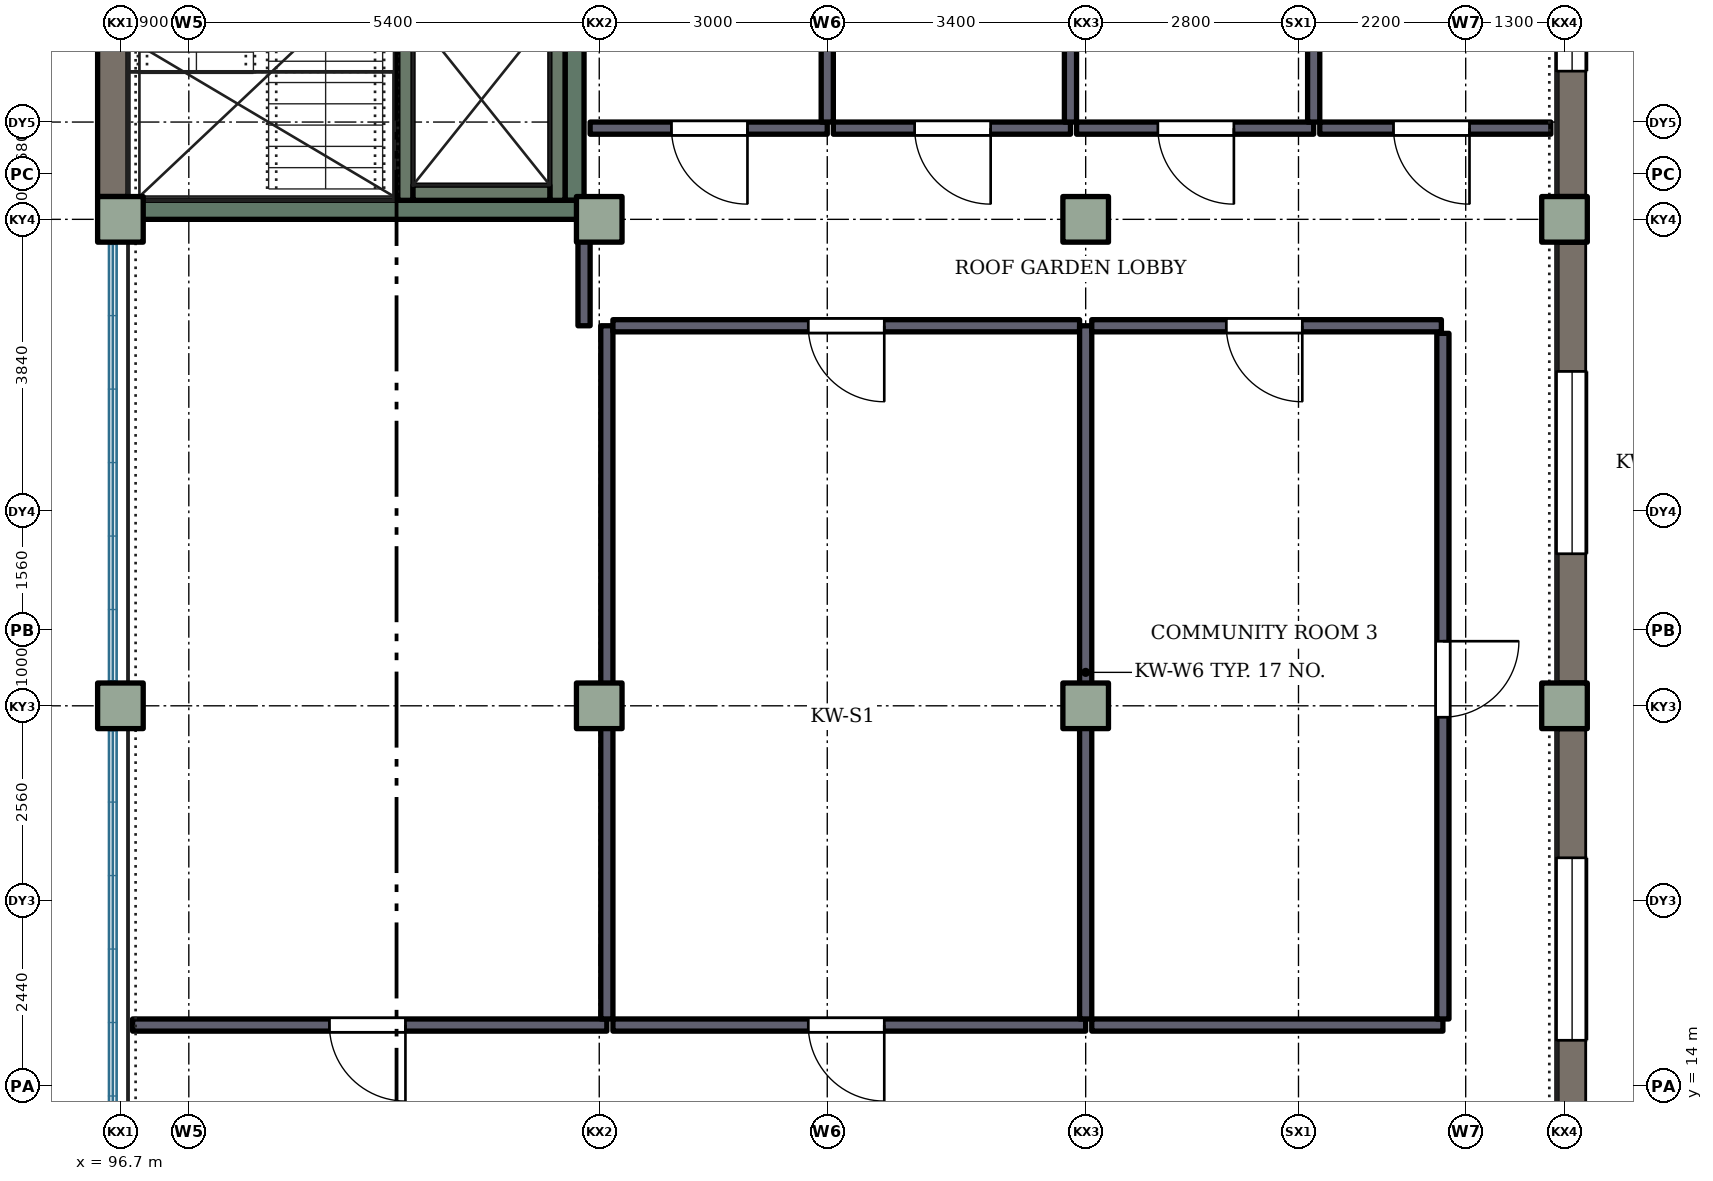
"""IFC4 building model, lengths in metres.
Left out: names, types, materials, properties, quantities, classifications, styles, units other than length and angle.
Written with IfcOpenShell. Run it as: python <this file> out.ifc"""

import sys

from ifc_helpers import new_model, si_unit, direction, frame, frame_2d, origin, origin_2d, place, context, subcontext, project, spatial, rectangle, extrude, element, fill, save


model = new_model("IFC4")
c1 = context("Model", 3, precision=1e-05, world=origin(), true_north=direction((0.0, 1.0)))
c2 = subcontext(c1, "Body", "Model", "MODEL_VIEW")
j1 = project(units=[si_unit("LENGTHUNIT", "METRE"), si_unit("PLANEANGLEUNIT", "RADIAN")], contexts=[c1])
p1 = place(None, origin())
s1 = spatial("IfcSite", under=j1, at=p1, CompositionType="ELEMENT")
p2 = place(p1, origin())
s2 = spatial("IfcBuilding", under=s1, at=p2, CompositionType="ELEMENT")
p3 = place(p2, frame((0.0, 0.0, 8.4)))
s3 = spatial("IfcBuildingStorey", under=s2, at=p3, CompositionType="ELEMENT", Elevation=8.4)
for number, where, z_axis, x_axis in (
    (1, (96.7, 19.0, 0.0), (0.0, 0.0, 1.0), (1.0, 0.0, 0.0)),
    (2, (96.7, 25.4, 0.0), (0.0, 0.0, 1.0), (1.0, 0.0, 0.0)),
    (3, (103.0, 19.0, 0.0), (0.0, 0.0, 1.0), (1.0, 0.0, 0.0)),
    (4, (103.0, 25.4, 0.0), (0.0, 0.0, 1.0), (1.0, 0.0, 0.0)),
    (5, (109.4, 19.0, 0.0), (0.0, 0.0, 1.0), (1.0, 0.0, 0.0)),
    (6, (109.4, 25.4, 0.0), (0.0, 0.0, 1.0), (1.0, 0.0, 0.0)),
    (7, (115.7, 19.0, 0.0), (0.0, 0.0, 1.0), (1.0, 0.0, 0.0)),
    (8, (115.7, 25.4, 0.0), (0.0, 0.0, 1.0), (1.0, 0.0, 0.0)),
):
    element("IfcColumn", number, at=place(p3, frame(where, z_axis=z_axis, x_axis=x_axis)), inside=s3, PredefinedType="COLUMN", context=c2, shape_type="SweptSolid", body=[
        extrude(rectangle(XDim=0.6, YDim=0.6, at=origin_2d()), origin(), (0.0, 0.0, 1.0), 4.2),
    ])
p4 = place(p3, frame((96.6, 25.7, 0.0), z_axis=(0.0, 0.0, 1.0), x_axis=(0.0, 1.0, 0.0)))
e9 = element("IfcWall", 9, at=p4, inside=s3, PredefinedType="SOLIDWALL", context=c2, shape_type="SweptSolid", body=[
    extrude(rectangle(XDim=5.7, YDim=0.4, at=frame_2d((2.85, 0.0))), origin(), (0.0, 0.0, 1.0), 4.2),
])
p5 = place(p3, frame((115.8, 18.7, 0.0), z_axis=(0.0, 0.0, 1.0), x_axis=(0.0, -1.0, 0.0)))
e10 = element("IfcWall", 10, at=p5, inside=s3, PredefinedType="SOLIDWALL", context=c2, shape_type="SweptSolid", body=[
    extrude(rectangle(XDim=5.8, YDim=0.4, at=frame_2d((2.9, 0.0))), origin(), (0.0, 0.0, 1.0), 4.2),
])
p6 = place(p5, frame((1.7, 0.0, 0.9)))
e11 = element("IfcOpeningElement", 11, at=p6, cuts=e10, PredefinedType="OPENING", context=c2, shape_type="SweptSolid", body=[
    extrude(rectangle(XDim=2.4, YDim=2.7, at=frame_2d((1.2, 1.35))), frame((0.0, 0.21, 0.0), z_axis=(0.0, -1.0, 0.0), x_axis=(1.0, 0.0, 0.0)), (0.0, 0.0, 1.0), 0.42),
])
p7 = place(p3, frame((115.8, 25.1, 0.0), z_axis=(0.0, 0.0, 1.0), x_axis=(0.0, -1.0, 0.0)))
e12 = element("IfcWall", 12, at=p7, inside=s3, PredefinedType="SOLIDWALL", context=c2, shape_type="SweptSolid", body=[
    extrude(rectangle(XDim=5.8, YDim=0.4, at=frame_2d((2.9, 0.0))), origin(), (0.0, 0.0, 1.0), 4.2),
])
p8 = place(p7, frame((1.7, 0.0, 0.9)))
e13 = element("IfcOpeningElement", 13, at=p8, cuts=e12, PredefinedType="OPENING", context=c2, shape_type="SweptSolid", body=[
    extrude(rectangle(XDim=2.4, YDim=2.7, at=frame_2d((1.2, 1.35))), frame((0.0, 0.21, 0.0), z_axis=(0.0, -1.0, 0.0), x_axis=(1.0, 0.0, 0.0)), (0.0, 0.0, 1.0), 0.42),
])
p9 = place(p3, frame((115.8, 31.4, 0.0), z_axis=(0.0, 0.0, 1.0), x_axis=(0.0, -1.0, 0.0)))
e14 = element("IfcWall", 14, at=p9, inside=s3, PredefinedType="SOLIDWALL", context=c2, shape_type="SweptSolid", body=[
    extrude(rectangle(XDim=5.7, YDim=0.4, at=frame_2d((2.85, 0.0))), origin(), (0.0, 0.0, 1.0), 4.2),
])
p10 = place(p9, frame((1.65, 0.0, 0.9)))
e15 = element("IfcOpeningElement", 15, at=p10, cuts=e14, PredefinedType="OPENING", context=c2, shape_type="SweptSolid", body=[
    extrude(rectangle(XDim=2.4, YDim=2.7, at=frame_2d((1.2, 1.35))), frame((0.0, 0.21, 0.0), z_axis=(0.0, -1.0, 0.0), x_axis=(1.0, 0.0, 0.0)), (0.0, 0.0, 1.0), 0.42),
])
p11 = place(p3, frame((102.675, 25.65, 0.0), z_axis=(0.0, 0.0, 1.0), x_axis=(0.0, 1.0, 0.0)))
e16 = element("IfcWall", 16, at=p11, inside=s3, PredefinedType="SHEAR", context=c2, shape_type="SweptSolid", body=[
    extrude(rectangle(XDim=5.95, YDim=0.25, at=frame_2d((2.975, 0.0))), origin(), (0.0, 0.0, 1.0), 4.2),
])
p12 = place(p11, frame((4.0, 0.0, 0.0)))
e17 = element("IfcOpeningElement", 17, at=p12, cuts=e16, PredefinedType="OPENING", context=c2, shape_type="SweptSolid", body=[
    extrude(rectangle(XDim=1.0, YDim=2.1, at=frame_2d((0.5, 1.05))), frame((0.0, 0.135, 0.0), z_axis=(0.0, -1.0, 0.0), x_axis=(1.0, 0.0, 0.0)), (0.0, 0.0, 1.0), 0.27),
])
p13 = place(p3, frame((96.8, 25.525, 0.0), z_axis=(0.0, 0.0, 1.0), x_axis=(1.0, 0.0, 0.0)))
e18 = element("IfcWall", 18, at=p13, inside=s3, PredefinedType="SHEAR", context=c2, shape_type="SweptSolid", body=[
    extrude(rectangle(XDim=6.0, YDim=0.25, at=frame_2d((3.0, 0.0))), origin(), (0.0, 0.0, 1.0), 4.2),
])
for number, where, z_axis, x_axis in (
    (19, (100.45, 25.65, 0.0), (0.0, 0.0, 1.0), (0.0, 1.0, 0.0)),
    (20, (102.45, 25.65, 0.0), (0.0, 0.0, 1.0), (0.0, 1.0, 0.0)),
):
    element("IfcWall", number, at=place(p3, frame(where, z_axis=z_axis, x_axis=x_axis)), inside=s3, PredefinedType="SHEAR", context=c2, shape_type="SweptSolid", body=[
        extrude(rectangle(XDim=2.65, YDim=0.2, at=frame_2d((1.325, 0.0))), origin(), (0.0, 0.0, 1.0), 4.2),
    ])
p14 = place(p3, frame((100.55, 25.75, 0.0), z_axis=(0.0, 0.0, 1.0), x_axis=(1.0, 0.0, 0.0)))
e21 = element("IfcWall", 21, at=p14, inside=s3, PredefinedType="SHEAR", context=c2, shape_type="SweptSolid", body=[
    extrude(rectangle(XDim=1.8, YDim=0.2, at=frame_2d((0.9, 0.0))), origin(), (0.0, 0.0, 1.0), 4.2),
])
p15 = place(p3, frame((102.8, 24.0, 0.0), z_axis=(0.0, 0.0, 1.0), x_axis=(0.0, 1.0, 0.0)))
e22 = element("IfcWall", 22, at=p15, inside=s3, PredefinedType="PARTITIONING", context=c2, shape_type="SweptSolid", body=[
    extrude(rectangle(XDim=1.32, YDim=0.16, at=frame_2d((0.66, 0.0))), origin(), (0.0, 0.0, 1.0), 3.9),
])
p16 = place(p3, frame((103.1, 14.8, 0.0), z_axis=(0.0, 0.0, 1.0), x_axis=(-1.0, 0.0, 0.0)))
e23 = element("IfcWall", 23, at=p16, inside=s3, PredefinedType="PARTITIONING", context=c2, shape_type="SweptSolid", body=[
    extrude(rectangle(XDim=6.24, YDim=0.16, at=frame_2d((3.12, 0.0))), origin(), (0.0, 0.0, 1.0), 3.9),
])
p17 = place(p16, frame((2.65, 0.0, 0.0)))
e24 = element("IfcOpeningElement", 24, at=p17, cuts=e23, PredefinedType="OPENING", context=c2, shape_type="SweptSolid", body=[
    extrude(rectangle(XDim=1.0, YDim=2.1, at=frame_2d((0.5, 1.05))), frame((0.0, 0.09, 0.0), z_axis=(0.0, -1.0, 0.0), x_axis=(1.0, 0.0, 0.0)), (0.0, 0.0, 1.0), 0.18),
])
p18 = place(p3, frame((103.1, 14.88, 0.0), z_axis=(0.0, 0.0, 1.0), x_axis=(0.0, 1.0, 0.0)))
e25 = element("IfcWall", 25, at=p18, inside=s3, PredefinedType="PARTITIONING", context=c2, shape_type="SweptSolid", body=[
    extrude(rectangle(XDim=9.12, YDim=0.16, at=frame_2d((4.56, 0.0))), origin(), (0.0, 0.0, 1.0), 3.9),
])
p19 = place(p3, frame((106.0, 26.6, 0.0), z_axis=(0.0, 0.0, 1.0), x_axis=(-1.0, 0.0, 0.0)))
e26 = element("IfcWall", 26, at=p19, inside=s3, PredefinedType="PARTITIONING", context=c2, shape_type="SweptSolid", body=[
    extrude(rectangle(XDim=3.12, YDim=0.16, at=frame_2d((1.56, 0.0))), origin(), (0.0, 0.0, 1.0), 3.9),
])
p20 = place(p19, frame((1.05, 0.0, 0.0)))
e27 = element("IfcOpeningElement", 27, at=p20, cuts=e26, PredefinedType="OPENING", context=c2, shape_type="SweptSolid", body=[
    extrude(rectangle(XDim=1.0, YDim=2.1, at=frame_2d((0.5, 1.05))), frame((0.0, 0.09, 0.0), z_axis=(0.0, -1.0, 0.0), x_axis=(1.0, 0.0, 0.0)), (0.0, 0.0, 1.0), 0.18),
])
p21 = place(p3, frame((106.0, 26.68, 0.0), z_axis=(0.0, 0.0, 1.0), x_axis=(0.0, 1.0, 0.0)))
e28 = element("IfcWall", 28, at=p21, inside=s3, PredefinedType="PARTITIONING", context=c2, shape_type="SweptSolid", body=[
    extrude(rectangle(XDim=4.84, YDim=0.16, at=frame_2d((2.42, 0.0))), origin(), (0.0, 0.0, 1.0), 3.9),
])
p22 = place(p3, frame((109.2, 26.6, 0.0), z_axis=(0.0, 0.0, 1.0), x_axis=(-1.0, 0.0, 0.0)))
e29 = element("IfcWall", 29, at=p22, inside=s3, PredefinedType="PARTITIONING", context=c2, shape_type="SweptSolid", body=[
    extrude(rectangle(XDim=3.12, YDim=0.16, at=frame_2d((1.56, 0.0))), origin(), (0.0, 0.0, 1.0), 3.9),
])
p23 = place(p22, frame((1.05, 0.0, 0.0)))
e30 = element("IfcOpeningElement", 30, at=p23, cuts=e29, PredefinedType="OPENING", context=c2, shape_type="SweptSolid", body=[
    extrude(rectangle(XDim=1.0, YDim=2.1, at=frame_2d((0.5, 1.05))), frame((0.0, 0.09, 0.0), z_axis=(0.0, -1.0, 0.0), x_axis=(1.0, 0.0, 0.0)), (0.0, 0.0, 1.0), 0.18),
])
p24 = place(p3, frame((109.2, 26.68, 0.0), z_axis=(0.0, 0.0, 1.0), x_axis=(0.0, 1.0, 0.0)))
e31 = element("IfcWall", 31, at=p24, inside=s3, PredefinedType="PARTITIONING", context=c2, shape_type="SweptSolid", body=[
    extrude(rectangle(XDim=4.92, YDim=0.16, at=frame_2d((2.46, 0.0))), origin(), (0.0, 0.0, 1.0), 3.9),
])
p25 = place(p3, frame((109.32, 24.0, 0.0), z_axis=(0.0, 0.0, 1.0), x_axis=(-1.0, 0.0, 0.0)))
e32 = element("IfcWall", 32, at=p25, inside=s3, PredefinedType="PARTITIONING", context=c2, shape_type="SweptSolid", body=[
    extrude(rectangle(XDim=6.14, YDim=0.16, at=frame_2d((3.07, 0.0))), origin(), (0.0, 0.0, 1.0), 3.9),
])
p26 = place(p25, frame((2.57, 0.0, 0.0)))
e33 = element("IfcOpeningElement", 33, at=p26, cuts=e32, PredefinedType="OPENING", context=c2, shape_type="SweptSolid", body=[
    extrude(rectangle(XDim=1.0, YDim=2.1, at=frame_2d((0.5, 1.05))), frame((0.0, 0.09, 0.0), z_axis=(0.0, -1.0, 0.0), x_axis=(1.0, 0.0, 0.0)), (0.0, 0.0, 1.0), 0.18),
])
p27 = place(p3, frame((109.4, 14.8, 0.0), z_axis=(0.0, 0.0, 1.0), x_axis=(-1.0, 0.0, 0.0)))
e34 = element("IfcWall", 34, at=p27, inside=s3, PredefinedType="PARTITIONING", context=c2, shape_type="SweptSolid", body=[
    extrude(rectangle(XDim=6.22, YDim=0.16, at=frame_2d((3.11, 0.0))), origin(), (0.0, 0.0, 1.0), 3.9),
])
p28 = place(p27, frame((2.65, 0.0, 0.0)))
e35 = element("IfcOpeningElement", 35, at=p28, cuts=e34, PredefinedType="OPENING", context=c2, shape_type="SweptSolid", body=[
    extrude(rectangle(XDim=1.0, YDim=2.1, at=frame_2d((0.5, 1.05))), frame((0.0, 0.09, 0.0), z_axis=(0.0, -1.0, 0.0), x_axis=(1.0, 0.0, 0.0)), (0.0, 0.0, 1.0), 0.18),
])
p29 = place(p3, frame((109.4, 14.88, 0.0), z_axis=(0.0, 0.0, 1.0), x_axis=(0.0, 1.0, 0.0)))
e36 = element("IfcWall", 36, at=p29, inside=s3, PredefinedType="PARTITIONING", context=c2, shape_type="SweptSolid", body=[
    extrude(rectangle(XDim=9.12, YDim=0.16, at=frame_2d((4.56, 0.0))), origin(), (0.0, 0.0, 1.0), 3.9),
])
p30 = place(p3, frame((112.4, 26.6, 0.0), z_axis=(0.0, 0.0, 1.0), x_axis=(-1.0, 0.0, 0.0)))
e37 = element("IfcWall", 37, at=p30, inside=s3, PredefinedType="PARTITIONING", context=c2, shape_type="SweptSolid", body=[
    extrude(rectangle(XDim=3.12, YDim=0.16, at=frame_2d((1.56, 0.0))), origin(), (0.0, 0.0, 1.0), 3.9),
])
p31 = place(p30, frame((1.05, 0.0, 0.0)))
e38 = element("IfcOpeningElement", 38, at=p31, cuts=e37, PredefinedType="OPENING", context=c2, shape_type="SweptSolid", body=[
    extrude(rectangle(XDim=1.0, YDim=2.1, at=frame_2d((0.5, 1.05))), frame((0.0, 0.09, 0.0), z_axis=(0.0, -1.0, 0.0), x_axis=(1.0, 0.0, 0.0)), (0.0, 0.0, 1.0), 0.18),
])
p32 = place(p3, frame((112.4, 26.68, 0.0), z_axis=(0.0, 0.0, 1.0), x_axis=(0.0, 1.0, 0.0)))
e39 = element("IfcWall", 39, at=p32, inside=s3, PredefinedType="PARTITIONING", context=c2, shape_type="SweptSolid", body=[
    extrude(rectangle(XDim=4.84, YDim=0.16, at=frame_2d((2.42, 0.0))), origin(), (0.0, 0.0, 1.0), 3.9),
])
p33 = place(p3, frame((114.08, 24.0, 0.0), z_axis=(0.0, 0.0, 1.0), x_axis=(-1.0, 0.0, 0.0)))
e40 = element("IfcWall", 40, at=p33, inside=s3, PredefinedType="PARTITIONING", context=c2, shape_type="SweptSolid", body=[
    extrude(rectangle(XDim=4.6, YDim=0.16, at=frame_2d((2.3, 0.0))), origin(), (0.0, 0.0, 1.0), 3.9),
])
p34 = place(p33, frame((1.83, 0.0, 0.0)))
e41 = element("IfcOpeningElement", 41, at=p34, cuts=e40, PredefinedType="OPENING", context=c2, shape_type="SweptSolid", body=[
    extrude(rectangle(XDim=1.0, YDim=2.1, at=frame_2d((0.5, 1.05))), frame((0.0, 0.09, 0.0), z_axis=(0.0, -1.0, 0.0), x_axis=(1.0, 0.0, 0.0)), (0.0, 0.0, 1.0), 0.18),
])
p35 = place(p3, frame((114.1, 14.8, 0.0), z_axis=(0.0, 0.0, 1.0), x_axis=(-1.0, 0.0, 0.0)))
e42 = element("IfcWall", 42, at=p35, inside=s3, PredefinedType="PARTITIONING", context=c2, shape_type="SweptSolid", body=[
    extrude(rectangle(XDim=4.62, YDim=0.16, at=frame_2d((2.31, 0.0))), origin(), (0.0, 0.0, 1.0), 3.9),
])
p36 = place(p3, frame((114.1, 23.9, 0.0), z_axis=(0.0, 0.0, 1.0), x_axis=(0.0, -1.0, 0.0)))
e43 = element("IfcWall", 43, at=p36, inside=s3, PredefinedType="PARTITIONING", context=c2, shape_type="SweptSolid", body=[
    extrude(rectangle(XDim=9.02, YDim=0.16, at=frame_2d((4.51, 0.0))), origin(), (0.0, 0.0, 1.0), 3.9),
])
p37 = place(p36, frame((4.05, 0.0, 0.0)))
e44 = element("IfcOpeningElement", 44, at=p37, cuts=e43, PredefinedType="OPENING", context=c2, shape_type="SweptSolid", body=[
    extrude(rectangle(XDim=1.0, YDim=2.1, at=frame_2d((0.5, 1.05))), frame((0.0, 0.09, 0.0), z_axis=(0.0, -1.0, 0.0), x_axis=(1.0, 0.0, 0.0)), (0.0, 0.0, 1.0), 0.18),
])
p38 = place(p3, frame((115.52, 26.6, 0.0), z_axis=(0.0, 0.0, 1.0), x_axis=(-1.0, 0.0, 0.0)))
e45 = element("IfcWall", 45, at=p38, inside=s3, PredefinedType="PARTITIONING", context=c2, shape_type="SweptSolid", body=[
    extrude(rectangle(XDim=3.04, YDim=0.16, at=frame_2d((1.52, 0.0))), origin(), (0.0, 0.0, 1.0), 3.9),
])
p39 = place(p38, frame((1.07, 0.0, 0.0)))
e46 = element("IfcOpeningElement", 46, at=p39, cuts=e45, PredefinedType="OPENING", context=c2, shape_type="SweptSolid", body=[
    extrude(rectangle(XDim=1.0, YDim=2.1, at=frame_2d((0.5, 1.05))), frame((0.0, 0.09, 0.0), z_axis=(0.0, -1.0, 0.0), x_axis=(1.0, 0.0, 0.0)), (0.0, 0.0, 1.0), 0.18),
])
p40 = place(p3, frame((115.6, 18.78, 0.0), z_axis=(0.0, 0.0, 1.0), x_axis=(0.0, 1.0, 0.0)))
e47 = element("IfcWall", 47, at=p40, inside=s3, PredefinedType="PARTITIONING", context=c2, shape_type="SweptSolid", body=[
    extrude(rectangle(XDim=0.44, YDim=0.16, at=frame_2d((0.22, 0.0))), origin(), (0.0, 0.0, 1.0), 3.9),
])
p41 = place(p3, frame((115.6, 25.18, 0.0), z_axis=(0.0, 0.0, 1.0), x_axis=(0.0, 1.0, 0.0)))
e48 = element("IfcWall", 48, at=p41, inside=s3, PredefinedType="PARTITIONING", context=c2, shape_type="SweptSolid", body=[
    extrude(rectangle(XDim=0.44, YDim=0.16, at=frame_2d((0.22, 0.0))), origin(), (0.0, 0.0, 1.0), 3.9),
])
p42 = place(p6, origin())
e49 = element("IfcWindow", 49, at=p42, inside=s3, PartitioningType="SINGLE_PANEL", PredefinedType="WINDOW", context=c2, shape_type="SweptSolid", body=[
    extrude(rectangle(XDim=2.4, YDim=2.7, at=frame_2d((1.2, 1.35))), frame((0.0, 0.03, 0.0), z_axis=(0.0, -1.0, 0.0), x_axis=(1.0, 0.0, 0.0)), (0.0, 0.0, 1.0), 0.06),
])
fill(e11, e49)
p43 = place(p8, origin())
e50 = element("IfcWindow", 50, at=p43, inside=s3, PartitioningType="SINGLE_PANEL", PredefinedType="WINDOW", context=c2, shape_type="SweptSolid", body=[
    extrude(rectangle(XDim=2.4, YDim=2.7, at=frame_2d((1.2, 1.35))), frame((0.0, 0.03, 0.0), z_axis=(0.0, -1.0, 0.0), x_axis=(1.0, 0.0, 0.0)), (0.0, 0.0, 1.0), 0.06),
])
fill(e13, e50)
p44 = place(p10, origin())
e51 = element("IfcWindow", 51, at=p44, inside=s3, PartitioningType="SINGLE_PANEL", PredefinedType="WINDOW", context=c2, shape_type="SweptSolid", body=[
    extrude(rectangle(XDim=2.4, YDim=2.7, at=frame_2d((1.2, 1.35))), frame((0.0, 0.03, 0.0), z_axis=(0.0, -1.0, 0.0), x_axis=(1.0, 0.0, 0.0)), (0.0, 0.0, 1.0), 0.06),
])
fill(e15, e51)
p45 = place(p17, origin())
e52 = element("IfcDoor", 52, at=p45, inside=s3, OperationType="SINGLE_SWING_LEFT", PredefinedType="DOOR", context=c2, shape_type="SweptSolid", body=[
    extrude(rectangle(XDim=1.0, YDim=2.1, at=frame_2d((0.5, 1.05))), frame((0.0, 0.025, 0.0), z_axis=(0.0, -1.0, 0.0), x_axis=(1.0, 0.0, 0.0)), (0.0, 0.0, 1.0), 0.05),
])
fill(e24, e52)
p46 = place(p28, origin())
e53 = element("IfcDoor", 53, at=p46, inside=s3, OperationType="SINGLE_SWING_LEFT", PredefinedType="DOOR", context=c2, shape_type="SweptSolid", body=[
    extrude(rectangle(XDim=1.0, YDim=2.1, at=frame_2d((0.5, 1.05))), frame((0.0, 0.025, 0.0), z_axis=(0.0, -1.0, 0.0), x_axis=(1.0, 0.0, 0.0)), (0.0, 0.0, 1.0), 0.05),
])
fill(e35, e53)
p47 = place(p26, origin())
e54 = element("IfcDoor", 54, at=p47, inside=s3, OperationType="SINGLE_SWING_LEFT", PredefinedType="DOOR", context=c2, shape_type="SweptSolid", body=[
    extrude(rectangle(XDim=1.0, YDim=2.1, at=frame_2d((0.5, 1.05))), frame((0.0, 0.025, 0.0), z_axis=(0.0, -1.0, 0.0), x_axis=(1.0, 0.0, 0.0)), (0.0, 0.0, 1.0), 0.05),
])
fill(e33, e54)
p48 = place(p37, origin())
e55 = element("IfcDoor", 55, at=p48, inside=s3, OperationType="SINGLE_SWING_LEFT", PredefinedType="DOOR", context=c2, shape_type="SweptSolid", body=[
    extrude(rectangle(XDim=1.0, YDim=2.1, at=frame_2d((0.5, 1.05))), frame((0.0, 0.025, 0.0), z_axis=(0.0, -1.0, 0.0), x_axis=(1.0, 0.0, 0.0)), (0.0, 0.0, 1.0), 0.05),
])
fill(e44, e55)
p49 = place(p34, origin())
e56 = element("IfcDoor", 56, at=p49, inside=s3, OperationType="SINGLE_SWING_LEFT", PredefinedType="DOOR", context=c2, shape_type="SweptSolid", body=[
    extrude(rectangle(XDim=1.0, YDim=2.1, at=frame_2d((0.5, 1.05))), frame((0.0, 0.025, 0.0), z_axis=(0.0, -1.0, 0.0), x_axis=(1.0, 0.0, 0.0)), (0.0, 0.0, 1.0), 0.05),
])
fill(e41, e56)
p50 = place(p20, origin())
e57 = element("IfcDoor", 57, at=p50, inside=s3, OperationType="SINGLE_SWING_LEFT", PredefinedType="DOOR", context=c2, shape_type="SweptSolid", body=[
    extrude(rectangle(XDim=1.0, YDim=2.1, at=frame_2d((0.5, 1.05))), frame((0.0, 0.025, 0.0), z_axis=(0.0, -1.0, 0.0), x_axis=(1.0, 0.0, 0.0)), (0.0, 0.0, 1.0), 0.05),
])
fill(e27, e57)
p51 = place(p23, origin())
e58 = element("IfcDoor", 58, at=p51, inside=s3, OperationType="SINGLE_SWING_LEFT", PredefinedType="DOOR", context=c2, shape_type="SweptSolid", body=[
    extrude(rectangle(XDim=1.0, YDim=2.1, at=frame_2d((0.5, 1.05))), frame((0.0, 0.025, 0.0), z_axis=(0.0, -1.0, 0.0), x_axis=(1.0, 0.0, 0.0)), (0.0, 0.0, 1.0), 0.05),
])
fill(e30, e58)
p52 = place(p31, origin())
e59 = element("IfcDoor", 59, at=p52, inside=s3, OperationType="SINGLE_SWING_LEFT", PredefinedType="DOOR", context=c2, shape_type="SweptSolid", body=[
    extrude(rectangle(XDim=1.0, YDim=2.1, at=frame_2d((0.5, 1.05))), frame((0.0, 0.025, 0.0), z_axis=(0.0, -1.0, 0.0), x_axis=(1.0, 0.0, 0.0)), (0.0, 0.0, 1.0), 0.05),
])
fill(e38, e59)
p53 = place(p39, origin())
e60 = element("IfcDoor", 60, at=p53, inside=s3, OperationType="SINGLE_SWING_LEFT", PredefinedType="DOOR", context=c2, shape_type="SweptSolid", body=[
    extrude(rectangle(XDim=1.0, YDim=2.1, at=frame_2d((0.5, 1.05))), frame((0.0, 0.025, 0.0), z_axis=(0.0, -1.0, 0.0), x_axis=(1.0, 0.0, 0.0)), (0.0, 0.0, 1.0), 0.05),
])
fill(e46, e60)
save(model, sys.argv[1])
